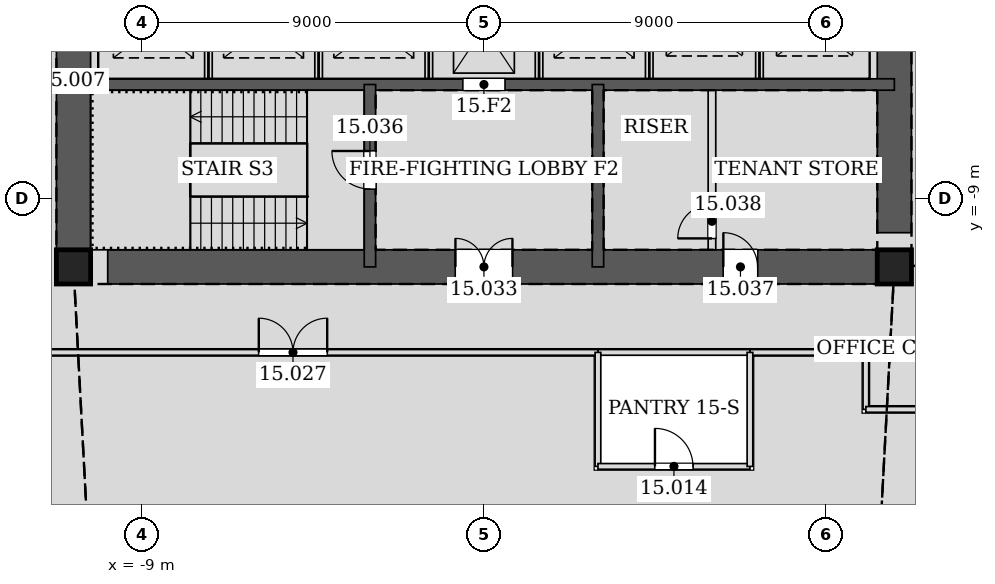
"""IFC4 building model, lengths in metres.
Left out: names, types, materials, properties, quantities, classifications, styles, units other than length and angle.
Written with IfcOpenShell. Run it as: python <this file> out.ifc"""

import sys

from ifc_helpers import new_model, si_unit, direction, frame, frame_2d, origin, origin_2d, place, context, subcontext, project, spatial, rectangle, hollow_rectangle, extrude, element, fill, save


model = new_model("IFC4")
c1 = context("Model", 3, precision=1e-05, world=origin(), true_north=direction((0.0, 1.0)))
c2 = subcontext(c1, "Body", "Model", "MODEL_VIEW")
j1 = project(units=[si_unit("LENGTHUNIT", "METRE"), si_unit("PLANEANGLEUNIT", "RADIAN")], contexts=[c1])
p1 = place(None, origin())
s1 = spatial("IfcSite", under=j1, at=p1, CompositionType="ELEMENT")
p2 = place(p1, origin())
s2 = spatial("IfcBuilding", under=s1, at=p2, CompositionType="ELEMENT")
p3 = place(p2, frame((0.0, 0.0, 70.8)))
s3 = spatial("IfcBuildingStorey", under=s2, at=p3, CompositionType="ELEMENT", Elevation=70.8)
for number, where, z_axis, x_axis in (
    (1, (-10.8, -10.8, 0.0), (0.0, 0.0, 1.0), (1.0, 0.0, 0.0)),
    (2, (10.8, -10.8, 0.0), (0.0, 0.0, 1.0), (1.0, 0.0, 0.0)),
):
    element("IfcColumn", number, at=place(p3, frame(where, z_axis=z_axis, x_axis=x_axis)), inside=s3, PredefinedType="COLUMN", context=c2, shape_type="SweptSolid", body=[
        extrude(hollow_rectangle(XDim=0.9, YDim=0.9, WallThickness=0.06, at=origin_2d()), origin(), (0.0, 0.0, 1.0), 4.2),
    ])
p4 = place(p3, frame((-10.8, -10.8, 0.0), z_axis=(0.0, 0.0, 1.0), x_axis=(1.0, 0.0, 0.0)))
e3 = element("IfcWall", 3, at=p4, inside=s3, PredefinedType="SOLIDWALL", context=c2, shape_type="SweptSolid", body=[
    extrude(rectangle(XDim=21.6, YDim=0.9, at=frame_2d((10.8, 0.0))), origin(), (0.0, 0.0, 1.0), 4.2),
])
p5 = place(p4, frame((10.05, 0.0, 0.0)))
e4 = element("IfcOpeningElement", 4, at=p5, cuts=e3, PredefinedType="OPENING", context=c2, shape_type="SweptSolid", body=[
    extrude(rectangle(XDim=1.5, YDim=2.1, at=frame_2d((0.75, 1.05))), frame((0.0, 0.46, 0.0), z_axis=(0.0, -1.0, 0.0), x_axis=(1.0, 0.0, 0.0)), (0.0, 0.0, 1.0), 0.92),
])
p6 = place(p4, frame((17.1, 0.0, 0.0)))
e5 = element("IfcOpeningElement", 5, at=p6, cuts=e3, PredefinedType="OPENING", context=c2, shape_type="SweptSolid", body=[
    extrude(rectangle(XDim=0.9, YDim=2.1, at=frame_2d((0.45, 1.05))), frame((0.0, 0.46, 0.0), z_axis=(0.0, -1.0, 0.0), x_axis=(1.0, 0.0, 0.0)), (0.0, 0.0, 1.0), 0.92),
])
p7 = place(p3, frame((10.8, -10.8, 0.0), z_axis=(0.0, 0.0, 1.0), x_axis=(0.0, 1.0, 0.0)))
e6 = element("IfcWall", 6, at=p7, inside=s3, PredefinedType="SOLIDWALL", context=c2, shape_type="SweptSolid", body=[
    extrude(rectangle(XDim=21.6, YDim=0.9, at=frame_2d((10.8, 0.0))), origin(), (0.0, 0.0, 1.0), 4.2),
])
p8 = place(p7, frame((11.7, 0.0, 0.0)))
e7 = element("IfcOpeningElement", 7, at=p8, cuts=e6, PredefinedType="OPENING", context=c2, shape_type="SweptSolid", body=[
    extrude(rectangle(XDim=1.2, YDim=2.1, at=frame_2d((0.6, 1.05))), frame((0.0, 0.46, 0.0), z_axis=(0.0, -1.0, 0.0), x_axis=(1.0, 0.0, 0.0)), (0.0, 0.0, 1.0), 0.92),
])
p9 = place(p7, frame((8.7, 0.0, 0.0)))
e8 = element("IfcOpeningElement", 8, at=p9, cuts=e6, PredefinedType="OPENING", context=c2, shape_type="SweptSolid", body=[
    extrude(rectangle(XDim=1.2, YDim=2.1, at=frame_2d((0.6, 1.05))), frame((0.0, 0.46, 0.0), z_axis=(0.0, -1.0, 0.0), x_axis=(1.0, 0.0, 0.0)), (0.0, 0.0, 1.0), 0.92),
])
p10 = place(p3, frame((-10.8, 10.8, 0.0), z_axis=(0.0, 0.0, 1.0), x_axis=(0.0, -1.0, 0.0)))
e9 = element("IfcWall", 9, at=p10, inside=s3, PredefinedType="SOLIDWALL", context=c2, shape_type="SweptSolid", body=[
    extrude(rectangle(XDim=21.6, YDim=0.9, at=frame_2d((10.8, 0.0))), origin(), (0.0, 0.0, 1.0), 4.2),
])
p11 = place(p10, frame((8.7, 0.0, 0.0)))
e10 = element("IfcOpeningElement", 10, at=p11, cuts=e9, PredefinedType="OPENING", context=c2, shape_type="SweptSolid", body=[
    extrude(rectangle(XDim=1.2, YDim=2.1, at=frame_2d((0.6, 1.05))), frame((0.0, 0.46, 0.0), z_axis=(0.0, -1.0, 0.0), x_axis=(1.0, 0.0, 0.0)), (0.0, 0.0, 1.0), 0.92),
])
p12 = place(p10, frame((11.7, 0.0, 0.0)))
e11 = element("IfcOpeningElement", 11, at=p12, cuts=e9, PredefinedType="OPENING", context=c2, shape_type="SweptSolid", body=[
    extrude(rectangle(XDim=1.2, YDim=2.1, at=frame_2d((0.6, 1.05))), frame((0.0, 0.46, 0.0), z_axis=(0.0, -1.0, 0.0), x_axis=(1.0, 0.0, 0.0)), (0.0, 0.0, 1.0), 0.92),
])
p13 = place(p3, frame((-10.8, -6.0, 0.0), z_axis=(0.0, 0.0, 1.0), x_axis=(1.0, 0.0, 0.0)))
e12 = element("IfcWall", 12, at=p13, inside=s3, PredefinedType="SOLIDWALL", context=c2, shape_type="SweptSolid", body=[
    extrude(rectangle(XDim=21.6, YDim=0.3, at=frame_2d((10.8, 0.0))), origin(), (0.0, 0.0, 1.0), 4.2),
])
p14 = place(p13, frame((10.25, 0.0, 0.0)))
e13 = element("IfcOpeningElement", 13, at=p14, cuts=e12, PredefinedType="OPENING", context=c2, shape_type="SweptSolid", body=[
    extrude(rectangle(XDim=1.1, YDim=2.1, at=frame_2d((0.55, 1.05))), frame((0.0, 0.16, 0.0), z_axis=(0.0, -1.0, 0.0), x_axis=(1.0, 0.0, 0.0)), (0.0, 0.0, 1.0), 0.32),
])
p15 = place(p3, frame((-3.0, -6.0, 0.0), z_axis=(0.0, 0.0, 1.0), x_axis=(0.0, -1.0, 0.0)))
e14 = element("IfcWall", 14, at=p15, inside=s3, PredefinedType="SOLIDWALL", context=c2, shape_type="SweptSolid", body=[
    extrude(rectangle(XDim=4.8, YDim=0.3, at=frame_2d((2.4, 0.0))), origin(), (0.0, 0.0, 1.0), 4.2),
])
p16 = place(p15, frame((1.75, 0.0, 0.0)))
e15 = element("IfcOpeningElement", 15, at=p16, cuts=e14, PredefinedType="OPENING", context=c2, shape_type="SweptSolid", body=[
    extrude(rectangle(XDim=1.0, YDim=2.1, at=frame_2d((0.5, 1.05))), frame((0.0, 0.16, 0.0), z_axis=(0.0, -1.0, 0.0), x_axis=(1.0, 0.0, 0.0)), (0.0, 0.0, 1.0), 0.32),
])
p17 = place(p3, frame((3.0, -6.0, 0.0), z_axis=(0.0, 0.0, 1.0), x_axis=(0.0, -1.0, 0.0)))
e16 = element("IfcWall", 16, at=p17, inside=s3, PredefinedType="SOLIDWALL", context=c2, shape_type="SweptSolid", body=[
    extrude(rectangle(XDim=4.8, YDim=0.3, at=frame_2d((2.4, 0.0))), origin(), (0.0, 0.0, 1.0), 4.2),
])
p18 = place(p3, frame((2.999, -13.05, 0.0), z_axis=(0.0, 0.0, 1.0), x_axis=(1.0, 0.0, 0.0)))
e17 = element("IfcWall", 17, at=p18, inside=s3, PredefinedType="PARTITIONING", context=c2, shape_type="SweptSolid", body=[
    extrude(rectangle(XDim=4.002, YDim=0.15, at=frame_2d((2.001, 0.0))), origin(), (0.0, 0.0, 1.0), 4.035),
])
p19 = place(p3, frame((-13.05, -13.05, 0.0), z_axis=(0.0, 0.0, 1.0), x_axis=(1.0, 0.0, 0.0)))
e18 = element("IfcWall", 18, at=p19, inside=s3, PredefinedType="PARTITIONING", context=c2, shape_type="SweptSolid", body=[
    extrude(rectangle(XDim=16.051, YDim=0.15, at=frame_2d((8.025, 0.0))), origin(), (0.0, 0.0, 1.0), 3.014),
])
p20 = place(p19, frame((7.125, 0.0, 0.0)))
e19 = element("IfcOpeningElement", 19, at=p20, cuts=e18, PredefinedType="OPENING", context=c2, shape_type="SweptSolid", body=[
    extrude(rectangle(XDim=1.8, YDim=2.4, at=frame_2d((0.9, 1.2))), frame((0.0, 0.085, 0.0), z_axis=(0.0, -1.0, 0.0), x_axis=(1.0, 0.0, 0.0)), (0.0, 0.0, 1.0), 0.17),
])
p21 = place(p3, frame((6.999, -13.05, 0.0), z_axis=(0.0, 0.0, 1.0), x_axis=(1.0, 0.0, 0.0)))
e20 = element("IfcWall", 20, at=p21, inside=s3, PredefinedType="PARTITIONING", context=c2, shape_type="SweptSolid", body=[
    extrude(rectangle(XDim=3.051, YDim=0.15, at=frame_2d((1.525, 0.0))), origin(), (0.0, 0.0, 1.0), 4.035),
])
p22 = place(p3, frame((10.05, -13.05, 0.0), z_axis=(0.0, 0.0, 1.0), x_axis=(0.0, -1.0, 0.0)))
e21 = element("IfcWall", 21, at=p22, inside=s3, PredefinedType="PARTITIONING", context=c2, shape_type="SweptSolid", body=[
    extrude(rectangle(XDim=1.5, YDim=0.15, at=frame_2d((0.75, 0.0))), origin(), (0.0, 0.0, 1.0), 3.423),
])
p23 = place(p3, frame((10.05, -14.55, 0.0), z_axis=(0.0, 0.0, 1.0), x_axis=(1.0, 0.0, 0.0)))
e22 = element("IfcWall", 22, at=p23, inside=s3, PredefinedType="PARTITIONING", context=c2, shape_type="SweptSolid", body=[
    extrude(rectangle(XDim=4.5, YDim=0.15, at=frame_2d((2.25, 0.0))), origin(), (0.0, 0.0, 1.0), 3.014),
])
p24 = place(p3, frame((3.0, -13.05, 0.0), z_axis=(0.0, 0.0, 1.0), x_axis=(0.0, -1.0, 0.0)))
e23 = element("IfcWall", 23, at=p24, inside=s3, PredefinedType="PARTITIONING", context=c2, shape_type="SweptSolid", body=[
    extrude(rectangle(XDim=3.0, YDim=0.15, at=frame_2d((1.5, 0.0))), origin(), (0.0, 0.0, 1.0), 3.423),
])
p25 = place(p3, frame((3.0, -16.05, 0.0), z_axis=(0.0, 0.0, 1.0), x_axis=(1.0, 0.0, 0.0)))
e24 = element("IfcWall", 24, at=p25, inside=s3, PredefinedType="PARTITIONING", context=c2, shape_type="SweptSolid", body=[
    extrude(rectangle(XDim=4.0, YDim=0.15, at=frame_2d((2.0, 0.0))), origin(), (0.0, 0.0, 1.0), 4.035),
])
p26 = place(p25, frame((1.5, 0.0, 0.0)))
e25 = element("IfcOpeningElement", 25, at=p26, cuts=e24, PredefinedType="OPENING", context=c2, shape_type="SweptSolid", body=[
    extrude(rectangle(XDim=1.0, YDim=2.1, at=frame_2d((0.5, 1.05))), frame((0.0, 0.085, 0.0), z_axis=(0.0, -1.0, 0.0), x_axis=(1.0, 0.0, 0.0)), (0.0, 0.0, 1.0), 0.17),
])
p27 = place(p3, frame((7.0, -16.05, 0.0), z_axis=(0.0, 0.0, 1.0), x_axis=(0.0, 1.0, 0.0)))
e26 = element("IfcWall", 26, at=p27, inside=s3, PredefinedType="PARTITIONING", context=c2, shape_type="SweptSolid", body=[
    extrude(rectangle(XDim=3.0, YDim=0.15, at=frame_2d((1.5, 0.0))), origin(), (0.0, 0.0, 1.0), 3.423),
])
for number, where, z_axis, x_axis in (
    (27, (-7.25, -5.85, 0.0), (0.0, 0.0, 1.0), (0.0, 1.0, 0.0)),
    (28, (-4.35, -5.85, 0.0), (0.0, 0.0, 1.0), (0.0, 1.0, 0.0)),
    (29, (-1.45, -5.85, 0.0), (0.0, 0.0, 1.0), (0.0, 1.0, 0.0)),
    (30, (1.45, -5.85, 0.0), (0.0, 0.0, 1.0), (0.0, 1.0, 0.0)),
    (31, (4.35, -5.85, 0.0), (0.0, 0.0, 1.0), (0.0, 1.0, 0.0)),
    (32, (7.25, -5.85, 0.0), (0.0, 0.0, 1.0), (0.0, 1.0, 0.0)),
):
    element("IfcWall", number, at=place(p3, frame(where, z_axis=z_axis, x_axis=x_axis)), inside=s3, PredefinedType="PARTITIONING", context=c2, shape_type="SweptSolid", body=[
        extrude(rectangle(XDim=2.7, YDim=0.2, at=frame_2d((1.35, 0.0))), origin(), (0.0, 0.0, 1.0), 4.2),
    ])
p28 = place(p3, frame((6.0, -10.35, 0.0), z_axis=(0.0, 0.0, 1.0), x_axis=(0.0, 1.0, 0.0)))
e33 = element("IfcWall", 33, at=p28, inside=s3, PredefinedType="PARTITIONING", context=c2, shape_type="SweptSolid", body=[
    extrude(rectangle(XDim=4.2, YDim=0.2, at=frame_2d((2.1, 0.0))), origin(), (0.0, 0.0, 1.0), 4.035),
])
p29 = place(p28, frame((0.3, 0.0, 0.0)))
e34 = element("IfcOpeningElement", 34, at=p29, cuts=e33, PredefinedType="OPENING", context=c2, shape_type="SweptSolid", body=[
    extrude(rectangle(XDim=0.9, YDim=2.1, at=frame_2d((0.45, 1.05))), frame((0.0, 0.11, 0.0), z_axis=(0.0, -1.0, 0.0), x_axis=(1.0, 0.0, 0.0)), (0.0, 0.0, 1.0), 0.22),
])
p30 = place(p26, origin())
e35 = element("IfcDoor", 35, at=p30, inside=s3, OperationType="SINGLE_SWING_LEFT", PredefinedType="DOOR", context=c2, shape_type="SweptSolid", body=[
    extrude(rectangle(XDim=1.0, YDim=2.1, at=frame_2d((0.5, 1.05))), frame((0.0, 0.025, 0.0), z_axis=(0.0, -1.0, 0.0), x_axis=(1.0, 0.0, 0.0)), (0.0, 0.0, 1.0), 0.05),
])
fill(e25, e35)
p31 = place(p20, origin())
e36 = element("IfcDoor", 36, at=p31, inside=s3, OperationType="DOUBLE_DOOR_SINGLE_SWING", PredefinedType="DOOR", context=c2, shape_type="SweptSolid", body=[
    extrude(rectangle(XDim=1.8, YDim=2.4, at=frame_2d((0.9, 1.2))), frame((0.0, 0.025, 0.0), z_axis=(0.0, -1.0, 0.0), x_axis=(1.0, 0.0, 0.0)), (0.0, 0.0, 1.0), 0.05),
])
fill(e19, e36)
p32 = place(p5, origin())
e37 = element("IfcDoor", 37, at=p32, inside=s3, OperationType="DOUBLE_DOOR_SINGLE_SWING", PredefinedType="DOOR", context=c2, shape_type="SweptSolid", body=[
    extrude(rectangle(XDim=1.5, YDim=2.1, at=frame_2d((0.75, 1.05))), frame((0.0, 0.025, 0.0), z_axis=(0.0, -1.0, 0.0), x_axis=(1.0, 0.0, 0.0)), (0.0, 0.0, 1.0), 0.05),
])
fill(e4, e37)
p33 = place(p16, frame((1.0, 0.0, 0.0), z_axis=(0.0, 0.0, 1.0), x_axis=(-1.0, 0.0, 0.0)))
e38 = element("IfcDoor", 38, at=p33, inside=s3, OperationType="SINGLE_SWING_RIGHT", PredefinedType="DOOR", context=c2, shape_type="SweptSolid", body=[
    extrude(rectangle(XDim=1.0, YDim=2.1, at=frame_2d((0.5, 1.05))), frame((0.0, 0.025, 0.0), z_axis=(0.0, -1.0, 0.0), x_axis=(1.0, 0.0, 0.0)), (0.0, 0.0, 1.0), 0.05),
])
fill(e15, e38)
p34 = place(p6, origin())
e39 = element("IfcDoor", 39, at=p34, inside=s3, OperationType="SINGLE_SWING_LEFT", PredefinedType="DOOR", context=c2, shape_type="SweptSolid", body=[
    extrude(rectangle(XDim=0.9, YDim=2.1, at=frame_2d((0.45, 1.05))), frame((0.0, 0.025, 0.0), z_axis=(0.0, -1.0, 0.0), x_axis=(1.0, 0.0, 0.0)), (0.0, 0.0, 1.0), 0.05),
])
fill(e5, e39)
p35 = place(p29, origin())
e40 = element("IfcDoor", 40, at=p35, inside=s3, OperationType="SINGLE_SWING_LEFT", PredefinedType="DOOR", context=c2, shape_type="SweptSolid", body=[
    extrude(rectangle(XDim=0.9, YDim=2.1, at=frame_2d((0.45, 1.05))), frame((0.0, 0.025, 0.0), z_axis=(0.0, -1.0, 0.0), x_axis=(1.0, 0.0, 0.0)), (0.0, 0.0, 1.0), 0.05),
])
fill(e34, e40)
p36 = place(p14, origin())
e41 = element("IfcDoor", 41, at=p36, inside=s3, OperationType="DOUBLE_DOOR_SLIDING", PredefinedType="DOOR", context=c2, shape_type="SweptSolid", body=[
    extrude(rectangle(XDim=1.1, YDim=2.1, at=frame_2d((0.55, 1.05))), frame((0.0, 0.025, 0.0), z_axis=(0.0, -1.0, 0.0), x_axis=(1.0, 0.0, 0.0)), (0.0, 0.0, 1.0), 0.05),
])
fill(e13, e41)
save(model, sys.argv[1])
